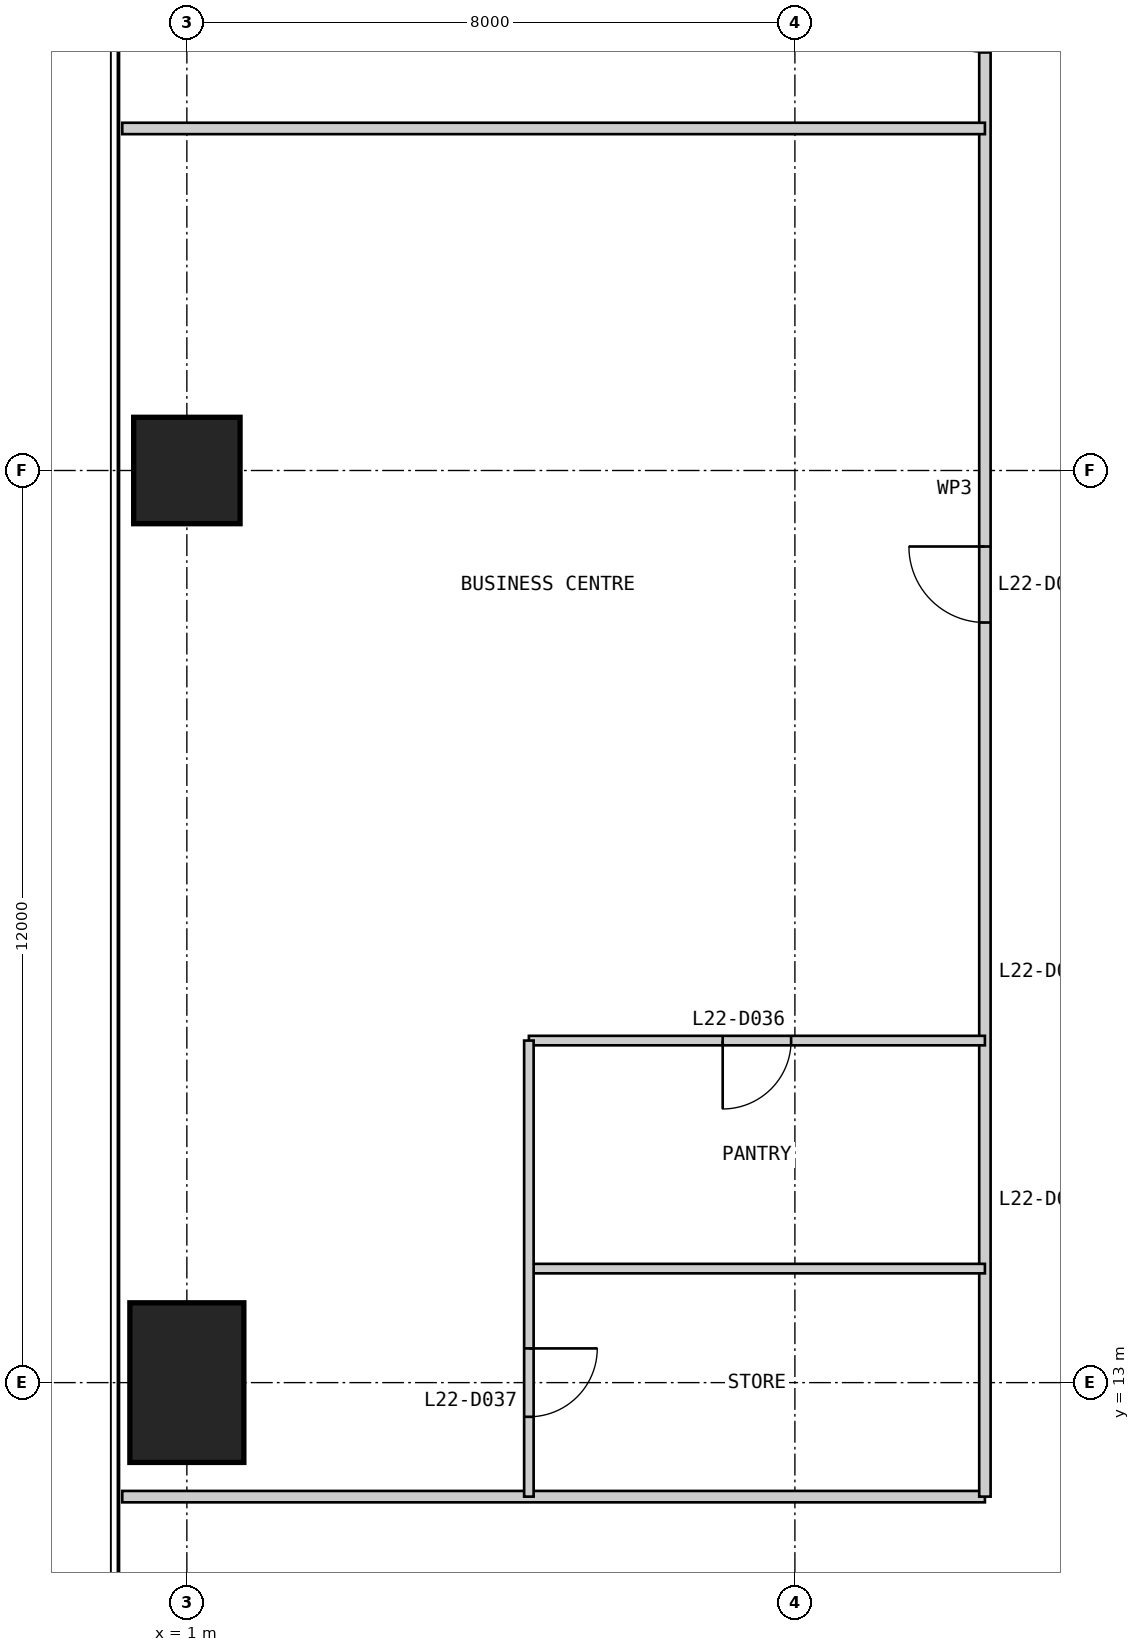
"""IFC4 building model, lengths in metres.
Left out: names, types, materials, properties, quantities, classifications, styles, units other than length and angle.
Written with IfcOpenShell. Run it as: python <this file> out.ifc"""

import sys

from ifc_helpers import new_model, si_unit, direction, frame, frame_2d, origin, origin_2d, place, context, subcontext, project, spatial, rectangle, extrude, element, fill, save


model = new_model("IFC4")
c1 = context("Model", 3, precision=1e-05, world=origin(), true_north=direction((0.0, 1.0)))
c2 = subcontext(c1, "Body", "Model", "MODEL_VIEW")
j1 = project(units=[si_unit("LENGTHUNIT", "METRE"), si_unit("PLANEANGLEUNIT", "RADIAN")], contexts=[c1])
p1 = place(None, origin())
s1 = spatial("IfcSite", under=j1, at=p1, CompositionType="ELEMENT")
p2 = place(p1, origin())
s2 = spatial("IfcBuilding", under=s1, at=p2, CompositionType="ELEMENT")
p3 = place(p2, frame((0.0, 0.0, 97.0)))
s3 = spatial("IfcBuildingStorey", under=s2, at=p3, CompositionType="ELEMENT", Elevation=97.0)
p4 = place(p3, frame((1.0, 25.0, 0.0), z_axis=(0.0, 0.0, 1.0), x_axis=(1.0, 0.0, 0.0)))
e1 = element("IfcColumn", 1, at=p4, inside=s3, PredefinedType="COLUMN", context=c2, shape_type="SweptSolid", body=[
    extrude(rectangle(XDim=1.4, YDim=1.4, at=origin_2d()), origin(), (0.0, 0.0, 1.0), 5.4),
])
p5 = place(p3, frame((1.0, 13.0, 0.0), z_axis=(0.0, 0.0, 1.0), x_axis=(1.0, 0.0, 0.0)))
e2 = element("IfcColumn", 2, at=p5, inside=s3, PredefinedType="COLUMN", context=c2, shape_type="SweptSolid", body=[
    extrude(rectangle(XDim=1.5, YDim=2.1, at=origin_2d()), origin(), (0.0, 0.0, 1.0), 5.4),
])
p6 = place(p3, frame((0.15, 11.5, 0.0), z_axis=(0.0, 0.0, 1.0), x_axis=(1.0, 0.0, 0.0)))
e3 = element("IfcWall", 3, at=p6, inside=s3, PredefinedType="PARTITIONING", context=c2, shape_type="SweptSolid", body=[
    extrude(rectangle(XDim=11.35, YDim=0.15, at=frame_2d((5.675, 0.0))), origin(), (0.0, 0.0, 1.0), 5.25),
])
p7 = place(p3, frame((11.5, 38.5, 0.0), z_axis=(0.0, 0.0, 1.0), x_axis=(0.0, -1.0, 0.0)))
e4 = element("IfcWall", 4, at=p7, inside=s3, PredefinedType="PARTITIONING", context=c2, shape_type="SweptSolid", body=[
    extrude(rectangle(XDim=27.0, YDim=0.15, at=frame_2d((13.5, 0.0))), origin(), (0.0, 0.0, 1.0), 5.25),
])
p8 = place(p7, frame((2.5, 0.0, 0.0)))
e5 = element("IfcOpeningElement", 5, at=p8, cuts=e4, PredefinedType="OPENING", context=c2, shape_type="SweptSolid", body=[
    extrude(rectangle(XDim=1.0, YDim=2.2, at=frame_2d((0.5, 1.1))), frame((0.0, 0.085, 0.0), z_axis=(0.0, -1.0, 0.0), x_axis=(1.0, 0.0, 0.0)), (0.0, 0.0, 1.0), 0.17),
])
p9 = place(p7, frame((7.0, 0.0, 0.0)))
e6 = element("IfcOpeningElement", 6, at=p9, cuts=e4, PredefinedType="OPENING", context=c2, shape_type="SweptSolid", body=[
    extrude(rectangle(XDim=1.0, YDim=2.2, at=frame_2d((0.5, 1.1))), frame((0.0, 0.085, 0.0), z_axis=(0.0, -1.0, 0.0), x_axis=(1.0, 0.0, 0.0)), (0.0, 0.0, 1.0), 0.17),
])
p10 = place(p7, frame((14.5, 0.0, 0.0)))
e7 = element("IfcOpeningElement", 7, at=p10, cuts=e4, PredefinedType="OPENING", context=c2, shape_type="SweptSolid", body=[
    extrude(rectangle(XDim=1.0, YDim=2.2, at=frame_2d((0.5, 1.1))), frame((0.0, 0.085, 0.0), z_axis=(0.0, -1.0, 0.0), x_axis=(1.0, 0.0, 0.0)), (0.0, 0.0, 1.0), 0.17),
])
p11 = place(p3, frame((0.15, 29.5, 0.0), z_axis=(0.0, 0.0, 1.0), x_axis=(1.0, 0.0, 0.0)))
e8 = element("IfcWall", 8, at=p11, inside=s3, PredefinedType="PARTITIONING", context=c2, shape_type="SweptSolid", body=[
    extrude(rectangle(XDim=11.35, YDim=0.15, at=frame_2d((5.675, 0.0))), origin(), (0.0, 0.0, 1.0), 5.25),
])
p12 = place(p3, frame((5.5, 17.5, 0.0), z_axis=(0.0, 0.0, 1.0), x_axis=(1.0, 0.0, 0.0)))
e9 = element("IfcWall", 9, at=p12, inside=s3, PredefinedType="PARTITIONING", context=c2, shape_type="SweptSolid", body=[
    extrude(rectangle(XDim=6.0, YDim=0.125, at=frame_2d((3.0, 0.0))), origin(), (0.0, 0.0, 1.0), 5.25),
])
p13 = place(p12, frame((2.55, 0.0, 0.0)))
e10 = element("IfcOpeningElement", 10, at=p13, cuts=e9, PredefinedType="OPENING", context=c2, shape_type="SweptSolid", body=[
    extrude(rectangle(XDim=0.9, YDim=2.2, at=frame_2d((0.45, 1.1))), frame((0.0, 0.073, 0.0), z_axis=(0.0, -1.0, 0.0), x_axis=(1.0, 0.0, 0.0)), (0.0, 0.0, 1.0), 0.145),
])
p14 = place(p3, frame((5.5, 14.5, 0.0), z_axis=(0.0, 0.0, 1.0), x_axis=(1.0, 0.0, 0.0)))
e11 = element("IfcWall", 11, at=p14, inside=s3, PredefinedType="PARTITIONING", context=c2, shape_type="SweptSolid", body=[
    extrude(rectangle(XDim=6.0, YDim=0.125, at=frame_2d((3.0, 0.0))), origin(), (0.0, 0.0, 1.0), 5.25),
])
p15 = place(p3, frame((5.5, 17.5, 0.0), z_axis=(0.0, 0.0, 1.0), x_axis=(0.0, -1.0, 0.0)))
e12 = element("IfcWall", 12, at=p15, inside=s3, PredefinedType="PARTITIONING", context=c2, shape_type="SweptSolid", body=[
    extrude(rectangle(XDim=6.0, YDim=0.125, at=frame_2d((3.0, 0.0))), origin(), (0.0, 0.0, 1.0), 5.25),
])
p16 = place(p15, frame((4.05, 0.0, 0.0)))
e13 = element("IfcOpeningElement", 13, at=p16, cuts=e12, PredefinedType="OPENING", context=c2, shape_type="SweptSolid", body=[
    extrude(rectangle(XDim=0.9, YDim=2.2, at=frame_2d((0.45, 1.1))), frame((0.0, 0.073, 0.0), z_axis=(0.0, -1.0, 0.0), x_axis=(1.0, 0.0, 0.0)), (0.0, 0.0, 1.0), 0.145),
])
p17 = place(p10, frame((1.0, 0.0, 0.0), z_axis=(0.0, 0.0, 1.0), x_axis=(-1.0, 0.0, 0.0)))
e14 = element("IfcDoor", 14, at=p17, inside=s3, OperationType="SINGLE_SWING_RIGHT", PredefinedType="DOOR", context=c2, shape_type="SweptSolid", body=[
    extrude(rectangle(XDim=1.0, YDim=2.2, at=frame_2d((0.5, 1.1))), frame((0.0, 0.025, 0.0), z_axis=(0.0, -1.0, 0.0), x_axis=(1.0, 0.0, 0.0)), (0.0, 0.0, 1.0), 0.05),
])
fill(e7, e14)
p18 = place(p13, frame((0.9, 0.0, 0.0), z_axis=(0.0, 0.0, 1.0), x_axis=(-1.0, 0.0, 0.0)))
e15 = element("IfcDoor", 15, at=p18, inside=s3, OperationType="SINGLE_SWING_RIGHT", PredefinedType="DOOR", context=c2, shape_type="SweptSolid", body=[
    extrude(rectangle(XDim=0.9, YDim=2.2, at=frame_2d((0.45, 1.1))), frame((0.0, 0.025, 0.0), z_axis=(0.0, -1.0, 0.0), x_axis=(1.0, 0.0, 0.0)), (0.0, 0.0, 1.0), 0.05),
])
fill(e10, e15)
p19 = place(p16, origin())
e16 = element("IfcDoor", 16, at=p19, inside=s3, OperationType="SINGLE_SWING_LEFT", PredefinedType="DOOR", context=c2, shape_type="SweptSolid", body=[
    extrude(rectangle(XDim=0.9, YDim=2.2, at=frame_2d((0.45, 1.1))), frame((0.0, 0.025, 0.0), z_axis=(0.0, -1.0, 0.0), x_axis=(1.0, 0.0, 0.0)), (0.0, 0.0, 1.0), 0.05),
])
fill(e13, e16)
save(model, sys.argv[1])
